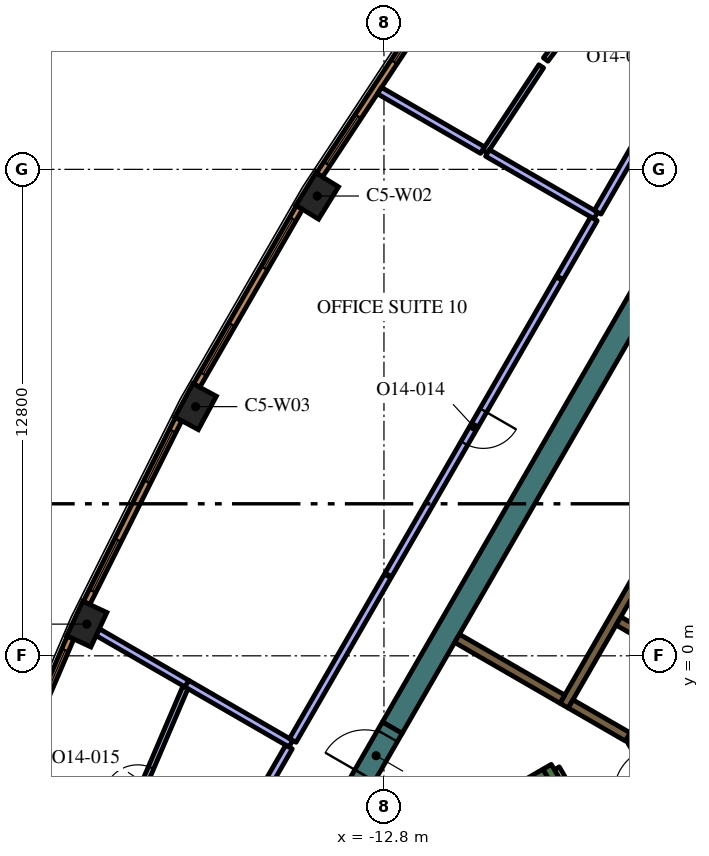
"""IFC4 building model, lengths in metres.
Left out: names, types, materials, properties, quantities, classifications, styles, units other than length and angle.
Written with IfcOpenShell. Run it as: python <this file> out.ifc"""

import sys

from ifc_helpers import new_model, si_unit, direction, frame, frame_2d, origin, origin_2d, place, context, subcontext, project, spatial, rectangle, extrude, element, fill, save


model = new_model("IFC4")
c1 = context("Model", 3, precision=1e-05, world=origin(), true_north=direction((0.0, 1.0)))
c2 = subcontext(c1, "Body", "Model", "MODEL_VIEW")
j1 = project(units=[si_unit("LENGTHUNIT", "METRE"), si_unit("PLANEANGLEUNIT", "RADIAN")], contexts=[c1])
p1 = place(None, origin())
s1 = spatial("IfcSite", under=j1, at=p1, CompositionType="ELEMENT")
p2 = place(p1, origin())
s2 = spatial("IfcBuilding", under=s1, at=p2, CompositionType="ELEMENT")
p3 = place(p2, frame((0.0, 0.0, 304.8)))
s3 = spatial("IfcBuildingStorey", under=s2, at=p3, CompositionType="ELEMENT", Elevation=304.8)
for number, where, z_axis, x_axis in (
    (1, (-14.556, 12.098, 0.0), (0.0, 0.0, 1.0), (-0.526, -0.851, 0.0)),
    (2, (-17.756, 6.557, 0.0), (0.0, 0.0, 1.0), (-0.474, -0.881, 0.0)),
    (3, (-20.619, 0.834, 0.0), (0.0, 0.0, 1.0), (-0.421, -0.907, 0.0)),
):
    element("IfcColumn", number, at=place(p3, frame(where, z_axis=z_axis, x_axis=x_axis)), inside=s3, PredefinedType="COLUMN", context=c2, shape_type="SweptSolid", body=[
        extrude(rectangle(XDim=1.0, YDim=0.7, at=origin_2d()), origin(), (0.0, 0.0, 1.0), 4.2),
    ])
p4 = place(p3, frame((-12.582, -1.892, 0.0), z_axis=(0.0, 0.0, 1.0), x_axis=(0.500003640647, 0.866023301845, 0.0)))
e4 = element("IfcWall", 4, at=p4, inside=s3, PredefinedType="SOLIDWALL", context=c2, shape_type="SweptSolid", body=[
    extrude(rectangle(XDim=15.858, YDim=0.6, at=frame_2d((7.929, 0.0))), origin(), (0.0, 0.0, 1.0), 4.2),
])
p5 = place(p3, frame((-14.44, -6.49, 0.0), z_axis=(0.0, 0.0, 1.0), x_axis=(0.866022966069, 0.500004222222, 0.0)))
e5 = element("IfcWall", 5, at=p5, inside=s3, PredefinedType="SOLIDWALL", context=c2, shape_type="SweptSolid", body=[
    extrude(rectangle(XDim=6.8, YDim=0.25, at=frame_2d((3.4, 0.0))), origin(), (0.0, 0.0, 1.0), 4.2),
])
p6 = place(p3, frame((-8.168, -3.503, 0.0), z_axis=(0.0, 0.0, 1.0), x_axis=(-0.499952099219, 0.866053057547, 0.0)))
e6 = element("IfcWall", 6, at=p6, inside=s3, PredefinedType="SOLIDWALL", context=c2, shape_type="SweptSolid", body=[
    extrude(rectangle(XDim=0.675, YDim=0.25, at=frame_2d((0.337, 0.0))), origin(), (0.0, 0.0, 1.0), 4.2),
])
p7 = place(p3, frame((-8.06, -1.311, 0.0), z_axis=(0.0, 0.0, 1.0), x_axis=(0.50000273126, 0.866023826885, 0.0)))
e7 = element("IfcWall", 7, at=p7, inside=s3, PredefinedType="SOLIDWALL", context=c2, shape_type="SweptSolid", body=[
    extrude(rectangle(XDim=10.33, YDim=0.25, at=frame_2d((5.165, 0.0))), origin(), (0.0, 0.0, 1.0), 4.2),
])
p8 = place(p3, frame((-4.724, -0.182, 0.0), z_axis=(0.0, 0.0, 1.0), x_axis=(-0.866008176907, 0.50002983664, 0.0)))
e8 = element("IfcWall", 8, at=p8, inside=s3, PredefinedType="SOLIDWALL", context=c2, shape_type="SweptSolid", body=[
    extrude(rectangle(XDim=2.2, YDim=0.25, at=frame_2d((1.1, 0.0))), origin(), (0.0, 0.0, 1.0), 4.2),
])
p9 = place(p3, frame((-7.889, -1.265, 0.0), z_axis=(0.0, 0.0, 1.0), x_axis=(0.865986741702, -0.500066958712, 0.0)))
e9 = element("IfcWall", 9, at=p9, inside=s3, PredefinedType="SOLIDWALL", context=c2, shape_type="SweptSolid", body=[
    extrude(rectangle(XDim=1.738, YDim=0.25, at=frame_2d((0.869, 0.0))), origin(), (0.0, 0.0, 1.0), 4.2),
])
p10 = place(p3, frame((-8.106, -1.14, 0.0), z_axis=(0.0, 0.0, 1.0), x_axis=(-0.866008981251, 0.500028443584, 0.0)))
e10 = element("IfcWall", 10, at=p10, inside=s3, PredefinedType="SOLIDWALL", context=c2, shape_type="SweptSolid", body=[
    extrude(rectangle(XDim=3.2, YDim=0.25, at=frame_2d((1.6, 0.0))), origin(), (0.0, 0.0, 1.0), 4.2),
])
p11 = place(p3, frame((-8.252, -2.958, 0.0), z_axis=(0.0, 0.0, 1.0), x_axis=(0.500174715838, -0.865924508047, 0.0)))
e11 = element("IfcWall", 11, at=p11, inside=s3, PredefinedType="PARTITIONING", context=c2, shape_type="SweptSolid", body=[
    extrude(rectangle(XDim=0.514, YDim=0.15, at=frame_2d((0.257, 0.0))), origin(), (0.0, 0.0, 1.0), 3.55),
])
p12 = place(p3, frame((-5.317, -3.99, 0.0), z_axis=(0.0, 0.0, 1.0), x_axis=(-0.500027713859, 0.866009402589, 0.0)))
e12 = element("IfcWall", 12, at=p12, inside=s3, PredefinedType="PARTITIONING", context=c2, shape_type="SweptSolid", body=[
    extrude(rectangle(XDim=2.1, YDim=0.15, at=frame_2d((1.05, 0.0))), origin(), (0.0, 0.0, 1.0), 4.2),
])
p13 = place(p12, frame((0.45, 0.0, 0.0)))
e13 = element("IfcOpeningElement", 13, at=p13, cuts=e12, PredefinedType="OPENING", context=c2, shape_type="SweptSolid", body=[
    extrude(rectangle(XDim=1.2, YDim=2.1, at=frame_2d((0.6, 1.05))), frame((0.0, 0.085, 0.0), z_axis=(0.0, -1.0, 0.0), x_axis=(1.0, 0.0, 0.0)), (0.0, 0.0, 1.0), 0.17),
])
p14 = place(p3, frame((-13.432, -3.364, 0.0), z_axis=(0.0, 0.0, 1.0), x_axis=(0.500062241894, 0.865989465428, 0.0)))
e14 = element("IfcWall", 14, at=p14, inside=s3, PredefinedType="SOLIDWALL", context=c2, shape_type="SweptSolid", body=[
    extrude(rectangle(XDim=1.7, YDim=0.6, at=frame_2d((0.85, 0.0))), origin(), (0.0, 0.0, 1.0), 4.2),
])
p15 = place(p14, frame((0.25, 0.0, 0.0)))
e15 = element("IfcOpeningElement", 15, at=p15, cuts=e14, PredefinedType="OPENING", context=c2, shape_type="SweptSolid", body=[
    extrude(rectangle(XDim=1.2, YDim=2.1, at=frame_2d((0.6, 1.05))), frame((0.0, 0.31, 0.0), z_axis=(0.0, -1.0, 0.0), x_axis=(1.0, 0.0, 0.0)), (0.0, 0.0, 1.0), 0.62),
])
p16 = place(p3, frame((-8.544, 15.69, 0.0), z_axis=(0.0, 0.0, 1.0), x_axis=(0.599538824769, 0.800345673815, 0.0)))
e16 = element("IfcWall", 16, at=p16, inside=s3, PredefinedType="PARTITIONING", context=c2, shape_type="SweptSolid", body=[
    extrude(rectangle(XDim=3.474, YDim=0.15, at=frame_2d((1.737, 0.0))), origin(), (0.0, 0.0, 1.0), 3.55),
])
p17 = place(p16, frame((1.274, 0.0, 0.0)))
e17 = element("IfcOpeningElement", 17, at=p17, cuts=e16, PredefinedType="OPENING", context=c2, shape_type="SweptSolid", body=[
    extrude(rectangle(XDim=0.9, YDim=2.1, at=frame_2d((0.45, 1.05))), frame((0.0, 0.085, 0.0), z_axis=(0.0, -1.0, 0.0), x_axis=(1.0, 0.0, 0.0)), (0.0, 0.0, 1.0), 0.17),
])
p18 = place(p3, frame((-8.662, 15.511, 0.0), z_axis=(0.0, 0.0, 1.0), x_axis=(-0.550792824442, -0.834641997831, 0.0)))
e18 = element("IfcWall", 18, at=p18, inside=s3, PredefinedType="PARTITIONING", context=c2, shape_type="SweptSolid", body=[
    extrude(rectangle(XDim=2.686, YDim=0.15, at=frame_2d((1.343, 0.0))), origin(), (0.0, 0.0, 1.0), 3.55),
])
p19 = place(p3, frame((-10.207, 13.306, 0.0), z_axis=(0.0, 0.0, 1.0), x_axis=(-0.866041434906, 0.499972232254, 0.0)))
e19 = element("IfcWall", 19, at=p19, inside=s3, PredefinedType="PARTITIONING", context=c2, shape_type="SweptSolid", body=[
    extrude(rectangle(XDim=3.131, YDim=0.2, at=frame_2d((1.565, 0.0))), origin(), (0.0, 0.0, 1.0), 3.55),
])
p20 = place(p3, frame((-7.226, 11.585, 0.0), z_axis=(0.0, 0.0, 1.0), x_axis=(-0.866034923029, 0.499983511822, 0.0)))
e20 = element("IfcWall", 20, at=p20, inside=s3, PredefinedType="PARTITIONING", context=c2, shape_type="SweptSolid", body=[
    extrude(rectangle(XDim=3.292, YDim=0.2, at=frame_2d((1.646, 0.0))), origin(), (0.0, 0.0, 1.0), 3.55),
])
p21 = place(p3, frame((-3.306, 18.374, 0.0), z_axis=(0.0, 0.0, 1.0), x_axis=(-0.500000072396, -0.866025361987, 0.0)))
e21 = element("IfcWall", 21, at=p21, inside=s3, PredefinedType="PARTITIONING", context=c2, shape_type="SweptSolid", body=[
    extrude(rectangle(XDim=7.739, YDim=0.2, at=frame_2d((3.87, 0.0))), origin(), (0.0, 0.0, 1.0), 3.55),
])
p22 = place(p21, frame((3.4, 0.0, 0.0)))
e22 = element("IfcOpeningElement", 22, at=p22, cuts=e21, PredefinedType="OPENING", context=c2, shape_type="SweptSolid", body=[
    extrude(rectangle(XDim=1.0, YDim=2.1, at=frame_2d((0.5, 1.05))), frame((0.0, 0.11, 0.0), z_axis=(0.0, -1.0, 0.0), x_axis=(1.0, 0.0, 0.0)), (0.0, 0.0, 1.0), 0.22),
])
p23 = place(p3, frame((-17.98, -0.736, 0.0), z_axis=(0.0, 0.0, 1.0), x_axis=(-0.866049350164, 0.49995852136, 0.0)))
e23 = element("IfcWall", 23, at=p23, inside=s3, PredefinedType="PARTITIONING", context=c2, shape_type="SweptSolid", body=[
    extrude(rectangle(XDim=2.716, YDim=0.2, at=frame_2d((1.358, 0.0))), origin(), (0.0, 0.0, 1.0), 3.55),
])
p24 = place(p3, frame((-15.249, -2.312, 0.0), z_axis=(0.0, 0.0, 1.0), x_axis=(-0.866053113424, 0.499952002425, 0.0)))
e24 = element("IfcWall", 24, at=p24, inside=s3, PredefinedType="PARTITIONING", context=c2, shape_type="SweptSolid", body=[
    extrude(rectangle(XDim=3.161, YDim=0.2, at=frame_2d((1.581, 0.0))), origin(), (0.0, 0.0, 1.0), 3.55),
])
p25 = place(p3, frame((-8.186, 9.922, 0.0), z_axis=(0.0, 0.0, 1.0), x_axis=(-0.5000018851, -0.866024315419, 0.0)))
e25 = element("IfcWall", 25, at=p25, inside=s3, PredefinedType="PARTITIONING", context=c2, shape_type="SweptSolid", body=[
    extrude(rectangle(XDim=9.0, YDim=0.2, at=frame_2d((4.5, 0.0))), origin(), (0.0, 0.0, 1.0), 3.55),
])
p26 = place(p25, frame((4.0, 0.0, 0.0)))
e26 = element("IfcOpeningElement", 26, at=p26, cuts=e25, PredefinedType="OPENING", context=c2, shape_type="SweptSolid", body=[
    extrude(rectangle(XDim=1.0, YDim=2.1, at=frame_2d((0.5, 1.05))), frame((0.0, 0.11, 0.0), z_axis=(0.0, -1.0, 0.0), x_axis=(1.0, 0.0, 0.0)), (0.0, 0.0, 1.0), 0.22),
])
p27 = place(p3, frame((-12.701, 2.102, 0.0), z_axis=(0.0, 0.0, 1.0), x_axis=(-0.499974782844, -0.866039962427, 0.0)))
e27 = element("IfcWall", 27, at=p27, inside=s3, PredefinedType="PARTITIONING", context=c2, shape_type="SweptSolid", body=[
    extrude(rectangle(XDim=4.997, YDim=0.2, at=frame_2d((2.499, 0.0))), origin(), (0.0, 0.0, 1.0), 3.55),
])
p28 = place(p3, frame((-7.275, 11.499, 0.0), z_axis=(0.0, 0.0, 1.0), x_axis=(-0.500025407441, -0.866010734295, 0.0)))
e28 = element("IfcWall", 28, at=p28, inside=s3, PredefinedType="PARTITIONING", context=c2, shape_type="SweptSolid", body=[
    extrude(rectangle(XDim=1.791, YDim=0.2, at=frame_2d((0.895, 0.0))), origin(), (0.0, 0.0, 1.0), 3.55),
])
p29 = place(p3, frame((-20.188, -5.888, 0.0), z_axis=(0.0, 0.0, 1.0), x_axis=(0.393346486154, 0.919390309841, 0.0)))
e29 = element("IfcWall", 29, at=p29, inside=s3, PredefinedType="PARTITIONING", context=c2, shape_type="SweptSolid", body=[
    extrude(rectangle(XDim=5.505, YDim=0.15, at=frame_2d((2.752, 0.0))), origin(), (0.0, 0.0, 1.0), 3.55),
])
p30 = place(p29, frame((2.305, 0.0, 0.0)))
e30 = element("IfcOpeningElement", 30, at=p30, cuts=e29, PredefinedType="OPENING", context=c2, shape_type="SweptSolid", body=[
    extrude(rectangle(XDim=0.9, YDim=2.1, at=frame_2d((0.45, 1.05))), frame((0.0, 0.085, 0.0), z_axis=(0.0, -1.0, 0.0), x_axis=(1.0, 0.0, 0.0)), (0.0, 0.0, 1.0), 0.17),
])
p31 = place(p3, frame((-15.299, -2.399, 0.0), z_axis=(0.0, 0.0, 1.0), x_axis=(-0.49998958839, -0.866031414847, 0.0)))
e31 = element("IfcWall", 31, at=p31, inside=s3, PredefinedType="PARTITIONING", context=c2, shape_type="SweptSolid", body=[
    extrude(rectangle(XDim=4.562, YDim=0.2, at=frame_2d((2.281, 0.0))), origin(), (0.0, 0.0, 1.0), 3.55),
])
p32 = place(p31, frame((1.8, 0.0, 0.0)))
e32 = element("IfcOpeningElement", 32, at=p32, cuts=e31, PredefinedType="OPENING", context=c2, shape_type="SweptSolid", body=[
    extrude(rectangle(XDim=1.0, YDim=2.1, at=frame_2d((0.5, 1.05))), frame((0.0, 0.11, 0.0), z_axis=(0.0, -1.0, 0.0), x_axis=(1.0, 0.0, 0.0)), (0.0, 0.0, 1.0), 0.22),
])
p33 = place(p3, frame((-11.518, 17.166, 0.0), z_axis=(0.0, 0.0, 1.0), x_axis=(-0.550744054781, -0.83467417962, 0.0)))
e33 = element("IfcWall", 33, at=p33, inside=s3, PredefinedType="SOLIDWALL", context=c2, shape_type="SweptSolid", body=[
    extrude(rectangle(XDim=5.406, YDim=0.19, at=frame_2d((2.703, 0.0))), origin(), (0.0, 0.0, 1.0), 3.95),
])
p34 = place(p33, frame((0.346, 0.0, 0.6)))
e34 = element("IfcOpeningElement", 34, at=p34, cuts=e33, PredefinedType="OPENING", context=c2, shape_type="SweptSolid", body=[
    extrude(rectangle(XDim=1.5, YDim=2.85, at=frame_2d((0.75, 1.425))), frame((0.0, 0.105, 0.0), z_axis=(0.0, -1.0, 0.0), x_axis=(1.0, 0.0, 0.0)), (0.0, 0.0, 1.0), 0.21),
])
p35 = place(p33, frame((3.559, 0.0, 0.6)))
e35 = element("IfcOpeningElement", 35, at=p35, cuts=e33, PredefinedType="OPENING", context=c2, shape_type="SweptSolid", body=[
    extrude(rectangle(XDim=1.5, YDim=2.85, at=frame_2d((0.75, 1.425))), frame((0.0, 0.105, 0.0), z_axis=(0.0, -1.0, 0.0), x_axis=(1.0, 0.0, 0.0)), (0.0, 0.0, 1.0), 0.21),
])
p36 = place(p3, frame((-15.025, 11.796, 0.0), z_axis=(0.0, 0.0, 1.0), x_axis=(-0.500024767483, -0.866011103799, 0.0)))
e36 = element("IfcWall", 36, at=p36, inside=s3, PredefinedType="SOLIDWALL", context=c2, shape_type="SweptSolid", body=[
    extrude(rectangle(XDim=5.406, YDim=0.19, at=frame_2d((2.703, 0.0))), origin(), (0.0, 0.0, 1.0), 3.95),
])
p37 = place(p36, frame((0.346, 0.0, 0.6)))
e37 = element("IfcOpeningElement", 37, at=p37, cuts=e36, PredefinedType="OPENING", context=c2, shape_type="SweptSolid", body=[
    extrude(rectangle(XDim=1.5, YDim=2.85, at=frame_2d((0.75, 1.425))), frame((0.0, 0.105, 0.0), z_axis=(0.0, -1.0, 0.0), x_axis=(1.0, 0.0, 0.0)), (0.0, 0.0, 1.0), 0.21),
])
p38 = place(p36, frame((3.559, 0.0, 0.6)))
e38 = element("IfcOpeningElement", 38, at=p38, cuts=e36, PredefinedType="OPENING", context=c2, shape_type="SweptSolid", body=[
    extrude(rectangle(XDim=1.5, YDim=2.85, at=frame_2d((0.75, 1.425))), frame((0.0, 0.105, 0.0), z_axis=(0.0, -1.0, 0.0), x_axis=(1.0, 0.0, 0.0)), (0.0, 0.0, 1.0), 0.21),
])
p39 = place(p3, frame((-18.206, 6.227, 0.0), z_axis=(0.0, 0.0, 1.0), x_axis=(-0.447484531401, -0.894291671747, 0.0)))
e39 = element("IfcWall", 39, at=p39, inside=s3, PredefinedType="SOLIDWALL", context=c2, shape_type="SweptSolid", body=[
    extrude(rectangle(XDim=5.406, YDim=0.19, at=frame_2d((2.703, 0.0))), origin(), (0.0, 0.0, 1.0), 3.95),
])
p40 = place(p39, frame((0.346, 0.0, 0.6)))
e40 = element("IfcOpeningElement", 40, at=p40, cuts=e39, PredefinedType="OPENING", context=c2, shape_type="SweptSolid", body=[
    extrude(rectangle(XDim=1.5, YDim=2.85, at=frame_2d((0.75, 1.425))), frame((0.0, 0.105, 0.0), z_axis=(0.0, -1.0, 0.0), x_axis=(1.0, 0.0, 0.0)), (0.0, 0.0, 1.0), 0.21),
])
p41 = place(p39, frame((3.559, 0.0, 0.6)))
e41 = element("IfcOpeningElement", 41, at=p41, cuts=e39, PredefinedType="OPENING", context=c2, shape_type="SweptSolid", body=[
    extrude(rectangle(XDim=1.5, YDim=2.85, at=frame_2d((0.75, 1.425))), frame((0.0, 0.105, 0.0), z_axis=(0.0, -1.0, 0.0), x_axis=(1.0, 0.0, 0.0)), (0.0, 0.0, 1.0), 0.21),
])
p42 = place(p3, frame((-21.049, 0.478, 0.0), z_axis=(0.0, 0.0, 1.0), x_axis=(-0.393347848476, -0.919389726992, 0.0)))
e42 = element("IfcWall", 42, at=p42, inside=s3, PredefinedType="SOLIDWALL", context=c2, shape_type="SweptSolid", body=[
    extrude(rectangle(XDim=5.415, YDim=0.19, at=frame_2d((2.708, 0.0))), origin(), (0.0, 0.0, 1.0), 3.95),
])
p43 = place(p42, frame((0.357, 0.0, 0.6)))
e43 = element("IfcOpeningElement", 43, at=p43, cuts=e42, PredefinedType="OPENING", context=c2, shape_type="SweptSolid", body=[
    extrude(rectangle(XDim=1.5, YDim=2.85, at=frame_2d((0.75, 1.425))), frame((0.0, 0.105, 0.0), z_axis=(0.0, -1.0, 0.0), x_axis=(1.0, 0.0, 0.0)), (0.0, 0.0, 1.0), 0.21),
])
p44 = place(p42, frame((3.593, 0.0, 0.6)))
e44 = element("IfcOpeningElement", 44, at=p44, cuts=e42, PredefinedType="OPENING", context=c2, shape_type="SweptSolid", body=[
    extrude(rectangle(XDim=1.5, YDim=2.85, at=frame_2d((0.75, 1.425))), frame((0.0, 0.105, 0.0), z_axis=(0.0, -1.0, 0.0), x_axis=(1.0, 0.0, 0.0)), (0.0, 0.0, 1.0), 0.21),
])
p45 = place(p15, origin())
e45 = element("IfcDoor", 45, at=p45, inside=s3, OperationType="SINGLE_SWING_LEFT", PredefinedType="DOOR", context=c2, shape_type="SweptSolid", body=[
    extrude(rectangle(XDim=1.2, YDim=2.1, at=frame_2d((0.6, 1.05))), frame((0.0, 0.025, 0.0), z_axis=(0.0, -1.0, 0.0), x_axis=(1.0, 0.0, 0.0)), (0.0, 0.0, 1.0), 0.05),
])
fill(e15, e45)
p46 = place(p26, origin())
e46 = element("IfcDoor", 46, at=p46, inside=s3, OperationType="SINGLE_SWING_LEFT", PredefinedType="DOOR", context=c2, shape_type="SweptSolid", body=[
    extrude(rectangle(XDim=1.0, YDim=2.1, at=frame_2d((0.5, 1.05))), frame((0.0, 0.025, 0.0), z_axis=(0.0, -1.0, 0.0), x_axis=(1.0, 0.0, 0.0)), (0.0, 0.0, 1.0), 0.05),
])
fill(e26, e46)
p47 = place(p30, origin())
e47 = element("IfcDoor", 47, at=p47, inside=s3, OperationType="SINGLE_SWING_RIGHT", PredefinedType="DOOR", context=c2, shape_type="SweptSolid", body=[
    extrude(rectangle(XDim=0.9, YDim=2.1, at=frame_2d((0.45, 1.05))), frame((0.0, 0.025, 0.0), z_axis=(0.0, -1.0, 0.0), x_axis=(1.0, 0.0, 0.0)), (0.0, 0.0, 1.0), 0.05),
])
fill(e30, e47)
p48 = place(p34, origin())
e48 = element("IfcWindow", 48, at=p48, inside=s3, PartitioningType="SINGLE_PANEL", PredefinedType="WINDOW", context=c2, shape_type="SweptSolid", body=[
    extrude(rectangle(XDim=1.5, YDim=2.85, at=frame_2d((0.75, 1.425))), frame((0.0, 0.045, 0.0), z_axis=(0.0, -1.0, 0.0), x_axis=(1.0, 0.0, 0.0)), (0.0, 0.0, 1.0), 0.06),
])
fill(e34, e48)
p49 = place(p35, origin())
e49 = element("IfcWindow", 49, at=p49, inside=s3, PartitioningType="SINGLE_PANEL", PredefinedType="WINDOW", context=c2, shape_type="SweptSolid", body=[
    extrude(rectangle(XDim=1.5, YDim=2.85, at=frame_2d((0.75, 1.425))), frame((0.0, 0.045, 0.0), z_axis=(0.0, -1.0, 0.0), x_axis=(1.0, 0.0, 0.0)), (0.0, 0.0, 1.0), 0.06),
])
fill(e35, e49)
p50 = place(p37, origin())
e50 = element("IfcWindow", 50, at=p50, inside=s3, PartitioningType="SINGLE_PANEL", PredefinedType="WINDOW", context=c2, shape_type="SweptSolid", body=[
    extrude(rectangle(XDim=1.5, YDim=2.85, at=frame_2d((0.75, 1.425))), frame((0.0, 0.045, 0.0), z_axis=(0.0, -1.0, 0.0), x_axis=(1.0, 0.0, 0.0)), (0.0, 0.0, 1.0), 0.06),
])
fill(e37, e50)
p51 = place(p38, origin())
e51 = element("IfcWindow", 51, at=p51, inside=s3, PartitioningType="SINGLE_PANEL", PredefinedType="WINDOW", context=c2, shape_type="SweptSolid", body=[
    extrude(rectangle(XDim=1.5, YDim=2.85, at=frame_2d((0.75, 1.425))), frame((0.0, 0.045, 0.0), z_axis=(0.0, -1.0, 0.0), x_axis=(1.0, 0.0, 0.0)), (0.0, 0.0, 1.0), 0.06),
])
fill(e38, e51)
p52 = place(p40, origin())
e52 = element("IfcWindow", 52, at=p52, inside=s3, PartitioningType="SINGLE_PANEL", PredefinedType="WINDOW", context=c2, shape_type="SweptSolid", body=[
    extrude(rectangle(XDim=1.5, YDim=2.85, at=frame_2d((0.75, 1.425))), frame((0.0, 0.045, 0.0), z_axis=(0.0, -1.0, 0.0), x_axis=(1.0, 0.0, 0.0)), (0.0, 0.0, 1.0), 0.06),
])
fill(e40, e52)
p53 = place(p41, origin())
e53 = element("IfcWindow", 53, at=p53, inside=s3, PartitioningType="SINGLE_PANEL", PredefinedType="WINDOW", context=c2, shape_type="SweptSolid", body=[
    extrude(rectangle(XDim=1.5, YDim=2.85, at=frame_2d((0.75, 1.425))), frame((0.0, 0.045, 0.0), z_axis=(0.0, -1.0, 0.0), x_axis=(1.0, 0.0, 0.0)), (0.0, 0.0, 1.0), 0.06),
])
fill(e41, e53)
p54 = place(p43, origin())
e54 = element("IfcWindow", 54, at=p54, inside=s3, PartitioningType="SINGLE_PANEL", PredefinedType="WINDOW", context=c2, shape_type="SweptSolid", body=[
    extrude(rectangle(XDim=1.5, YDim=2.85, at=frame_2d((0.75, 1.425))), frame((0.0, 0.045, 0.0), z_axis=(0.0, -1.0, 0.0), x_axis=(1.0, 0.0, 0.0)), (0.0, 0.0, 1.0), 0.06),
])
fill(e43, e54)
save(model, sys.argv[1])
